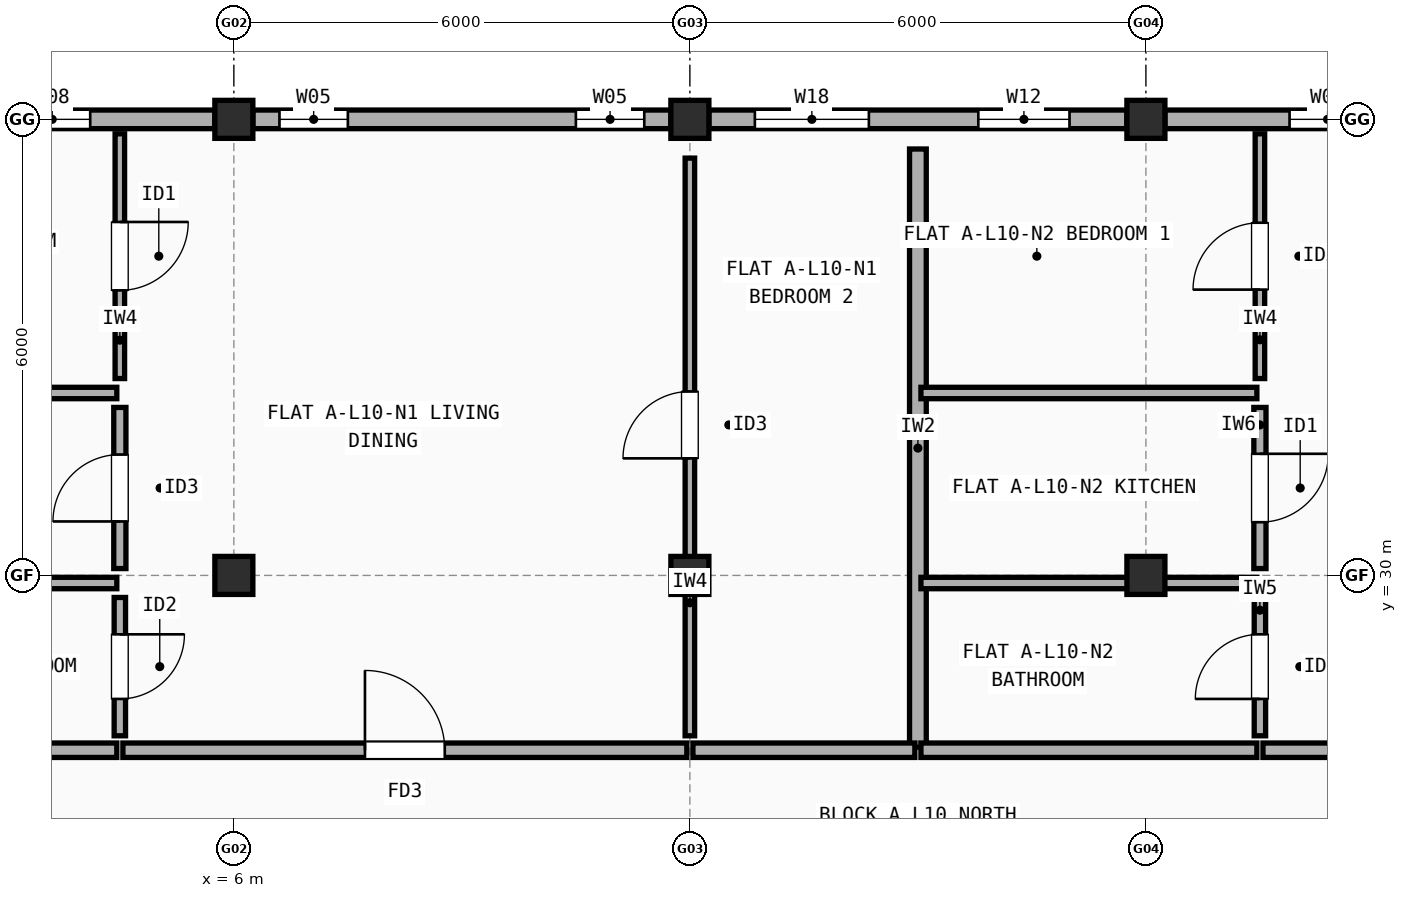
"""IFC4 building model, lengths in metres.
Left out: names, types, materials, properties, quantities, classifications, styles, units other than length and angle.
Written with IfcOpenShell. Run it as: python <this file> out.ifc"""

import sys

from ifc_helpers import new_model, si_unit, direction, frame, frame_2d, origin, origin_2d, place, context, subcontext, project, spatial, rectangle, extrude, element, fill, save


model = new_model("IFC4")
c1 = context("Model", 3, precision=1e-05, world=origin(), true_north=direction((0.0, 1.0)))
c2 = subcontext(c1, "Body", "Model", "MODEL_VIEW")
j1 = project(units=[si_unit("LENGTHUNIT", "METRE"), si_unit("PLANEANGLEUNIT", "RADIAN")], contexts=[c1])
p1 = place(None, origin())
s1 = spatial("IfcSite", under=j1, at=p1, CompositionType="ELEMENT")
p2 = place(p1, origin())
s2 = spatial("IfcBuilding", under=s1, at=p2, CompositionType="ELEMENT")
p3 = place(p2, frame((0.0, 0.0, 33.3)))
s3 = spatial("IfcBuildingStorey", under=s2, at=p3, CompositionType="ELEMENT", Elevation=33.3)
for number, where, z_axis, x_axis in (
    (1, (6.0, 30.0, 0.0), (0.0, 0.0, 1.0), (1.0, 0.0, 0.0)),
    (2, (6.0, 36.0, 0.0), (0.0, 0.0, 1.0), (1.0, 0.0, 0.0)),
    (3, (12.0, 30.0, 0.0), (0.0, 0.0, 1.0), (1.0, 0.0, 0.0)),
    (4, (12.0, 36.0, 0.0), (0.0, 0.0, 1.0), (1.0, 0.0, 0.0)),
    (5, (18.0, 30.0, 0.0), (0.0, 0.0, 1.0), (1.0, 0.0, 0.0)),
    (6, (18.0, 36.0, 0.0), (0.0, 0.0, 1.0), (1.0, 0.0, 0.0)),
):
    element("IfcColumn", number, at=place(p3, frame(where, z_axis=z_axis, x_axis=x_axis)), inside=s3, PredefinedType="COLUMN", context=c2, shape_type="SweptSolid", body=[
        extrude(rectangle(XDim=0.5, YDim=0.5, at=origin_2d()), origin(), (0.0, 0.0, 1.0), 2.99),
    ])
p4 = place(p3, frame((23.75, 36.0, 0.0), z_axis=(0.0, 0.0, 1.0), x_axis=(-1.0, 0.0, 0.0)))
e7 = element("IfcWall", 7, at=p4, inside=s3, PredefinedType="STANDARD", context=c2, shape_type="SweptSolid", body=[
    extrude(rectangle(XDim=5.5, YDim=0.245, at=frame_2d((2.75, 0.0))), origin(), (0.0, 0.0, 1.0), 2.472),
])
p5 = place(p4, frame((0.35, 0.0, 0.9)))
e8 = element("IfcOpeningElement", 8, at=p5, cuts=e7, PredefinedType="OPENING", context=c2, shape_type="SweptSolid", body=[
    extrude(rectangle(XDim=1.0, YDim=1.4, at=frame_2d((0.5, 0.7))), frame((0.0, 0.133, 0.0), z_axis=(0.0, -1.0, 0.0), x_axis=(1.0, 0.0, 0.0)), (0.0, 0.0, 1.0), 0.265),
])
p6 = place(p4, frame((2.86, 0.0, 0.9)))
e9 = element("IfcOpeningElement", 9, at=p6, cuts=e7, PredefinedType="OPENING", context=c2, shape_type="SweptSolid", body=[
    extrude(rectangle(XDim=1.0, YDim=1.4, at=frame_2d((0.5, 0.7))), frame((0.0, 0.133, 0.0), z_axis=(0.0, -1.0, 0.0), x_axis=(1.0, 0.0, 0.0)), (0.0, 0.0, 1.0), 0.265),
])
p7 = place(p3, frame((17.75, 36.0, 0.0), z_axis=(0.0, 0.0, 1.0), x_axis=(-1.0, 0.0, 0.0)))
e10 = element("IfcWall", 10, at=p7, inside=s3, PredefinedType="STANDARD", context=c2, shape_type="SweptSolid", body=[
    extrude(rectangle(XDim=5.5, YDim=0.245, at=frame_2d((2.75, 0.0))), origin(), (0.0, 0.0, 1.0), 2.472),
])
p8 = place(p7, frame((0.755, 0.0, 0.9)))
e11 = element("IfcOpeningElement", 11, at=p8, cuts=e10, PredefinedType="OPENING", context=c2, shape_type="SweptSolid", body=[
    extrude(rectangle(XDim=1.2, YDim=1.35, at=frame_2d((0.6, 0.675))), frame((0.0, 0.133, 0.0), z_axis=(0.0, -1.0, 0.0), x_axis=(1.0, 0.0, 0.0)), (0.0, 0.0, 1.0), 0.265),
])
p9 = place(p7, frame((3.395, 0.0, 0.9)))
e12 = element("IfcOpeningElement", 12, at=p9, cuts=e10, PredefinedType="OPENING", context=c2, shape_type="SweptSolid", body=[
    extrude(rectangle(XDim=1.5, YDim=1.4, at=frame_2d((0.75, 0.7))), frame((0.0, 0.133, 0.0), z_axis=(0.0, -1.0, 0.0), x_axis=(1.0, 0.0, 0.0)), (0.0, 0.0, 1.0), 0.265),
])
p10 = place(p3, frame((11.75, 36.0, 0.0), z_axis=(0.0, 0.0, 1.0), x_axis=(-1.0, 0.0, 0.0)))
e13 = element("IfcWall", 13, at=p10, inside=s3, PredefinedType="STANDARD", context=c2, shape_type="SweptSolid", body=[
    extrude(rectangle(XDim=5.5, YDim=0.245, at=frame_2d((2.75, 0.0))), origin(), (0.0, 0.0, 1.0), 2.472),
])
p11 = place(p10, frame((0.35, 0.0, 0.9)))
e14 = element("IfcOpeningElement", 14, at=p11, cuts=e13, PredefinedType="OPENING", context=c2, shape_type="SweptSolid", body=[
    extrude(rectangle(XDim=0.9, YDim=1.4, at=frame_2d((0.45, 0.7))), frame((0.0, 0.133, 0.0), z_axis=(0.0, -1.0, 0.0), x_axis=(1.0, 0.0, 0.0)), (0.0, 0.0, 1.0), 0.265),
])
p12 = place(p10, frame((4.25, 0.0, 0.9)))
e15 = element("IfcOpeningElement", 15, at=p12, cuts=e13, PredefinedType="OPENING", context=c2, shape_type="SweptSolid", body=[
    extrude(rectangle(XDim=0.9, YDim=1.4, at=frame_2d((0.45, 0.7))), frame((0.0, 0.133, 0.0), z_axis=(0.0, -1.0, 0.0), x_axis=(1.0, 0.0, 0.0)), (0.0, 0.0, 1.0), 0.265),
])
p13 = place(p3, frame((5.75, 36.0, 0.0), z_axis=(0.0, 0.0, 1.0), x_axis=(-1.0, 0.0, 0.0)))
e16 = element("IfcWall", 16, at=p13, inside=s3, PredefinedType="STANDARD", context=c2, shape_type="SweptSolid", body=[
    extrude(rectangle(XDim=5.525, YDim=0.245, at=frame_2d((2.762, 0.0))), origin(), (0.0, 0.0, 1.0), 2.472),
])
p14 = place(p13, frame((1.64, 0.0, 0.9)))
e17 = element("IfcOpeningElement", 17, at=p14, cuts=e16, PredefinedType="OPENING", context=c2, shape_type="SweptSolid", body=[
    extrude(rectangle(XDim=1.0, YDim=1.4, at=frame_2d((0.5, 0.7))), frame((0.0, 0.133, 0.0), z_axis=(0.0, -1.0, 0.0), x_axis=(1.0, 0.0, 0.0)), (0.0, 0.0, 1.0), 0.265),
])
p15 = place(p13, frame((4.175, 0.0, 0.9)))
e18 = element("IfcOpeningElement", 18, at=p15, cuts=e16, PredefinedType="OPENING", context=c2, shape_type="SweptSolid", body=[
    extrude(rectangle(XDim=1.0, YDim=1.4, at=frame_2d((0.5, 0.7))), frame((0.0, 0.133, 0.0), z_axis=(0.0, -1.0, 0.0), x_axis=(1.0, 0.0, 0.0)), (0.0, 0.0, 1.0), 0.265),
])
p16 = place(p3, frame((15.0, 27.74, 0.0), z_axis=(0.0, 0.0, 1.0), x_axis=(0.0, 1.0, 0.0)))
e19 = element("IfcWall", 19, at=p16, inside=s3, PredefinedType="SOLIDWALL", context=c2, shape_type="SweptSolid", body=[
    extrude(rectangle(XDim=7.87, YDim=0.22, at=frame_2d((3.935, 0.0))), origin(), (0.0, 0.0, 1.0), 2.472),
])
p17 = place(p3, frame((0.04, 27.7, 0.0), z_axis=(0.0, 0.0, 1.0), x_axis=(1.0, 0.0, 0.0)))
e20 = element("IfcWall", 20, at=p17, inside=s3, PredefinedType="SOLIDWALL", context=c2, shape_type="SweptSolid", body=[
    extrude(rectangle(XDim=4.42, YDim=0.19, at=frame_2d((2.21, 0.0))), origin(), (0.0, 0.0, 1.0), 2.472),
])
p18 = place(p3, frame((4.54, 27.7, 0.0), z_axis=(0.0, 0.0, 1.0), x_axis=(1.0, 0.0, 0.0)))
e21 = element("IfcWall", 21, at=p18, inside=s3, PredefinedType="SOLIDWALL", context=c2, shape_type="SweptSolid", body=[
    extrude(rectangle(XDim=7.42, YDim=0.19, at=frame_2d((3.71, 0.0))), origin(), (0.0, 0.0, 1.0), 2.508),
])
p19 = place(p18, frame((3.185, 0.0, 0.0)))
e22 = element("IfcOpeningElement", 22, at=p19, cuts=e21, PredefinedType="OPENING", context=c2, shape_type="SweptSolid", body=[
    extrude(rectangle(XDim=1.05, YDim=2.15, at=frame_2d((0.525, 1.075))), frame((0.0, 0.105, 0.0), z_axis=(0.0, -1.0, 0.0), x_axis=(1.0, 0.0, 0.0)), (0.0, 0.0, 1.0), 0.21),
])
p20 = place(p3, frame((4.5, 32.59, 0.0), z_axis=(0.0, 0.0, 1.0), x_axis=(0.0, 1.0, 0.0)))
e23 = element("IfcWall", 23, at=p20, inside=s3, PredefinedType="PARTITIONING", context=c2, shape_type="SweptSolid", body=[
    extrude(rectangle(XDim=3.22, YDim=0.125, at=frame_2d((1.61, 0.0))), origin(), (0.0, 0.0, 1.0), 2.99),
])
p21 = place(p20, frame((1.16, 0.0, 0.0)))
e24 = element("IfcOpeningElement", 24, at=p21, cuts=e23, PredefinedType="OPENING", context=c2, shape_type="SweptSolid", body=[
    extrude(rectangle(XDim=0.9, YDim=2.1, at=frame_2d((0.45, 1.05))), frame((0.0, 0.073, 0.0), z_axis=(0.0, -1.0, 0.0), x_axis=(1.0, 0.0, 0.0)), (0.0, 0.0, 1.0), 0.145),
])
p22 = place(p3, frame((4.5, 30.09, 0.0), z_axis=(0.0, 0.0, 1.0), x_axis=(0.0, 1.0, 0.0)))
e25 = element("IfcWall", 25, at=p22, inside=s3, PredefinedType="PLUMBINGWALL", context=c2, shape_type="SweptSolid", body=[
    extrude(rectangle(XDim=2.12, YDim=0.16, at=frame_2d((1.06, 0.0))), origin(), (0.0, 0.0, 1.0), 2.472),
])
p23 = place(p22, frame((0.62, 0.0, 0.0)))
e26 = element("IfcOpeningElement", 26, at=p23, cuts=e25, PredefinedType="OPENING", context=c2, shape_type="SweptSolid", body=[
    extrude(rectangle(XDim=0.88, YDim=2.1, at=frame_2d((0.44, 1.05))), frame((0.0, 0.09, 0.0), z_axis=(0.0, -1.0, 0.0), x_axis=(1.0, 0.0, 0.0)), (0.0, 0.0, 1.0), 0.18),
])
p24 = place(p3, frame((4.5, 27.89, 0.0), z_axis=(0.0, 0.0, 1.0), x_axis=(0.0, 1.0, 0.0)))
e27 = element("IfcWall", 27, at=p24, inside=s3, PredefinedType="PARTITIONING", context=c2, shape_type="SweptSolid", body=[
    extrude(rectangle(XDim=1.82, YDim=0.15, at=frame_2d((0.91, 0.0))), origin(), (0.0, 0.0, 1.0), 2.99),
])
p25 = place(p24, frame((0.485, 0.0, 0.0)))
e28 = element("IfcOpeningElement", 28, at=p25, cuts=e27, PredefinedType="OPENING", context=c2, shape_type="SweptSolid", body=[
    extrude(rectangle(XDim=0.85, YDim=2.1, at=frame_2d((0.425, 1.05))), frame((0.0, 0.085, 0.0), z_axis=(0.0, -1.0, 0.0), x_axis=(1.0, 0.0, 0.0)), (0.0, 0.0, 1.0), 0.17),
])
p26 = place(p3, frame((0.04, 32.4, 0.0), z_axis=(0.0, 0.0, 1.0), x_axis=(1.0, 0.0, 0.0)))
e29 = element("IfcWall", 29, at=p26, inside=s3, PredefinedType="PARTITIONING", context=c2, shape_type="SweptSolid", body=[
    extrude(rectangle(XDim=4.42, YDim=0.15, at=frame_2d((2.21, 0.0))), origin(), (0.0, 0.0, 1.0), 2.472),
])
p27 = place(p3, frame((0.36, 29.9, 0.0), z_axis=(0.0, 0.0, 1.0), x_axis=(1.0, 0.0, 0.0)))
e30 = element("IfcWall", 30, at=p27, inside=s3, PredefinedType="PARTITIONING", context=c2, shape_type="SweptSolid", body=[
    extrude(rectangle(XDim=4.1, YDim=0.15, at=frame_2d((2.05, 0.0))), origin(), (0.0, 0.0, 1.0), 2.472),
])
p28 = place(p3, frame((12.04, 27.7, 0.0), z_axis=(0.0, 0.0, 1.0), x_axis=(1.0, 0.0, 0.0)))
e31 = element("IfcWall", 31, at=p28, inside=s3, PredefinedType="SOLIDWALL", context=c2, shape_type="SweptSolid", body=[
    extrude(rectangle(XDim=2.92, YDim=0.19, at=frame_2d((1.46, 0.0))), origin(), (0.0, 0.0, 1.0), 2.508),
])
p29 = place(p3, frame((12.0, 27.89, 0.0), z_axis=(0.0, 0.0, 1.0), x_axis=(0.0, 1.0, 0.0)))
e32 = element("IfcWall", 32, at=p29, inside=s3, PredefinedType="PARTITIONING", context=c2, shape_type="SweptSolid", body=[
    extrude(rectangle(XDim=7.6, YDim=0.125, at=frame_2d((3.8, 0.0))), origin(), (0.0, 0.0, 1.0), 2.458),
])
p30 = place(p29, frame((3.65, 0.0, 0.0)))
e33 = element("IfcOpeningElement", 33, at=p30, cuts=e32, PredefinedType="OPENING", context=c2, shape_type="SweptSolid", body=[
    extrude(rectangle(XDim=0.88, YDim=2.1, at=frame_2d((0.44, 1.05))), frame((0.0, 0.073, 0.0), z_axis=(0.0, -1.0, 0.0), x_axis=(1.0, 0.0, 0.0)), (0.0, 0.0, 1.0), 0.145),
])
p31 = place(p3, frame((15.04, 27.7, 0.0), z_axis=(0.0, 0.0, 1.0), x_axis=(1.0, 0.0, 0.0)))
e34 = element("IfcWall", 34, at=p31, inside=s3, PredefinedType="SOLIDWALL", context=c2, shape_type="SweptSolid", body=[
    extrude(rectangle(XDim=4.42, YDim=0.19, at=frame_2d((2.21, 0.0))), origin(), (0.0, 0.0, 1.0), 2.99),
])
p32 = place(p3, frame((19.54, 27.7, 0.0), z_axis=(0.0, 0.0, 1.0), x_axis=(1.0, 0.0, 0.0)))
e35 = element("IfcWall", 35, at=p32, inside=s3, PredefinedType="SOLIDWALL", context=c2, shape_type="SweptSolid", body=[
    extrude(rectangle(XDim=7.42, YDim=0.19, at=frame_2d((3.71, 0.0))), origin(), (0.0, 0.0, 1.0), 2.99),
])
p33 = place(p32, frame((3.22, 0.0, 0.0)))
e36 = element("IfcOpeningElement", 36, at=p33, cuts=e35, PredefinedType="OPENING", context=c2, shape_type="SweptSolid", body=[
    extrude(rectangle(XDim=0.98, YDim=2.15, at=frame_2d((0.49, 1.075))), frame((0.0, 0.105, 0.0), z_axis=(0.0, -1.0, 0.0), x_axis=(1.0, 0.0, 0.0)), (0.0, 0.0, 1.0), 0.21),
])
p34 = place(p3, frame((19.5, 32.59, 0.0), z_axis=(0.0, 0.0, 1.0), x_axis=(0.0, 1.0, 0.0)))
e37 = element("IfcWall", 37, at=p34, inside=s3, PredefinedType="PARTITIONING", context=c2, shape_type="SweptSolid", body=[
    extrude(rectangle(XDim=3.22, YDim=0.125, at=frame_2d((1.61, 0.0))), origin(), (0.0, 0.0, 1.0), 2.99),
])
p35 = place(p34, frame((1.17, 0.0, 0.0)))
e38 = element("IfcOpeningElement", 38, at=p35, cuts=e37, PredefinedType="OPENING", context=c2, shape_type="SweptSolid", body=[
    extrude(rectangle(XDim=0.88, YDim=2.1, at=frame_2d((0.44, 1.05))), frame((0.0, 0.073, 0.0), z_axis=(0.0, -1.0, 0.0), x_axis=(1.0, 0.0, 0.0)), (0.0, 0.0, 1.0), 0.145),
])
p36 = place(p3, frame((19.5, 30.09, 0.0), z_axis=(0.0, 0.0, 1.0), x_axis=(0.0, 1.0, 0.0)))
e39 = element("IfcWall", 39, at=p36, inside=s3, PredefinedType="PLUMBINGWALL", context=c2, shape_type="SweptSolid", body=[
    extrude(rectangle(XDim=2.12, YDim=0.16, at=frame_2d((1.06, 0.0))), origin(), (0.0, 0.0, 1.0), 2.472),
])
p37 = place(p36, frame((0.61, 0.0, 0.0)))
e40 = element("IfcOpeningElement", 40, at=p37, cuts=e39, PredefinedType="OPENING", context=c2, shape_type="SweptSolid", body=[
    extrude(rectangle(XDim=0.9, YDim=2.1, at=frame_2d((0.45, 1.05))), frame((0.0, 0.09, 0.0), z_axis=(0.0, -1.0, 0.0), x_axis=(1.0, 0.0, 0.0)), (0.0, 0.0, 1.0), 0.18),
])
p38 = place(p3, frame((19.5, 27.89, 0.0), z_axis=(0.0, 0.0, 1.0), x_axis=(0.0, 1.0, 0.0)))
e41 = element("IfcWall", 41, at=p38, inside=s3, PredefinedType="PARTITIONING", context=c2, shape_type="SweptSolid", body=[
    extrude(rectangle(XDim=1.82, YDim=0.15, at=frame_2d((0.91, 0.0))), origin(), (0.0, 0.0, 1.0), 2.99),
])
p39 = place(p38, frame((0.485, 0.0, 0.0)))
e42 = element("IfcOpeningElement", 42, at=p39, cuts=e41, PredefinedType="OPENING", context=c2, shape_type="SweptSolid", body=[
    extrude(rectangle(XDim=0.85, YDim=2.1, at=frame_2d((0.425, 1.05))), frame((0.0, 0.085, 0.0), z_axis=(0.0, -1.0, 0.0), x_axis=(1.0, 0.0, 0.0)), (0.0, 0.0, 1.0), 0.17),
])
p40 = place(p3, frame((15.04, 32.4, 0.0), z_axis=(0.0, 0.0, 1.0), x_axis=(1.0, 0.0, 0.0)))
e43 = element("IfcWall", 43, at=p40, inside=s3, PredefinedType="PARTITIONING", context=c2, shape_type="SweptSolid", body=[
    extrude(rectangle(XDim=4.42, YDim=0.15, at=frame_2d((2.21, 0.0))), origin(), (0.0, 0.0, 1.0), 2.458),
])
p41 = place(p3, frame((15.04, 29.9, 0.0), z_axis=(0.0, 0.0, 1.0), x_axis=(1.0, 0.0, 0.0)))
e44 = element("IfcWall", 44, at=p41, inside=s3, PredefinedType="PARTITIONING", context=c2, shape_type="SweptSolid", body=[
    extrude(rectangle(XDim=4.42, YDim=0.15, at=frame_2d((2.21, 0.0))), origin(), (0.0, 0.0, 1.0), 2.472),
])
p42 = place(p6, origin())
e45 = element("IfcWindow", 45, at=p42, inside=s3, PartitioningType="SINGLE_PANEL", PredefinedType="WINDOW", context=c2, shape_type="SweptSolid", body=[
    extrude(rectangle(XDim=1.0, YDim=1.4, at=frame_2d((0.5, 0.7))), frame((0.0, 0.03, 0.0), z_axis=(0.0, -1.0, 0.0), x_axis=(1.0, 0.0, 0.0)), (0.0, 0.0, 1.0), 0.06),
])
fill(e9, e45)
p43 = place(p8, origin())
e46 = element("IfcWindow", 46, at=p43, inside=s3, PartitioningType="SINGLE_PANEL", PredefinedType="WINDOW", context=c2, shape_type="SweptSolid", body=[
    extrude(rectangle(XDim=1.2, YDim=1.35, at=frame_2d((0.6, 0.675))), frame((0.0, 0.03, 0.0), z_axis=(0.0, -1.0, 0.0), x_axis=(1.0, 0.0, 0.0)), (0.0, 0.0, 1.0), 0.06),
])
fill(e11, e46)
p44 = place(p9, origin())
e47 = element("IfcWindow", 47, at=p44, inside=s3, PartitioningType="SINGLE_PANEL", PredefinedType="WINDOW", context=c2, shape_type="SweptSolid", body=[
    extrude(rectangle(XDim=1.5, YDim=1.4, at=frame_2d((0.75, 0.7))), frame((0.0, 0.03, 0.0), z_axis=(0.0, -1.0, 0.0), x_axis=(1.0, 0.0, 0.0)), (0.0, 0.0, 1.0), 0.06),
])
fill(e12, e47)
p45 = place(p11, origin())
e48 = element("IfcWindow", 48, at=p45, inside=s3, PartitioningType="SINGLE_PANEL", PredefinedType="WINDOW", context=c2, shape_type="SweptSolid", body=[
    extrude(rectangle(XDim=0.9, YDim=1.4, at=frame_2d((0.45, 0.7))), frame((0.0, 0.03, 0.0), z_axis=(0.0, -1.0, 0.0), x_axis=(1.0, 0.0, 0.0)), (0.0, 0.0, 1.0), 0.06),
])
fill(e14, e48)
p46 = place(p12, origin())
e49 = element("IfcWindow", 49, at=p46, inside=s3, PartitioningType="SINGLE_PANEL", PredefinedType="WINDOW", context=c2, shape_type="SweptSolid", body=[
    extrude(rectangle(XDim=0.9, YDim=1.4, at=frame_2d((0.45, 0.7))), frame((0.0, 0.03, 0.0), z_axis=(0.0, -1.0, 0.0), x_axis=(1.0, 0.0, 0.0)), (0.0, 0.0, 1.0), 0.06),
])
fill(e15, e49)
p47 = place(p14, origin())
e50 = element("IfcWindow", 50, at=p47, inside=s3, PartitioningType="SINGLE_PANEL", PredefinedType="WINDOW", context=c2, shape_type="SweptSolid", body=[
    extrude(rectangle(XDim=1.0, YDim=1.4, at=frame_2d((0.5, 0.7))), frame((0.0, 0.03, 0.0), z_axis=(0.0, -1.0, 0.0), x_axis=(1.0, 0.0, 0.0)), (0.0, 0.0, 1.0), 0.06),
])
fill(e17, e50)
p48 = place(p19, origin())
e51 = element("IfcDoor", 51, at=p48, inside=s3, OperationType="SINGLE_SWING_LEFT", PredefinedType="DOOR", context=c2, shape_type="SweptSolid", body=[
    extrude(rectangle(XDim=1.05, YDim=2.15, at=frame_2d((0.525, 1.075))), frame((0.0, 0.025, 0.0), z_axis=(0.0, -1.0, 0.0), x_axis=(1.0, 0.0, 0.0)), (0.0, 0.0, 1.0), 0.05),
])
fill(e22, e51)
p49 = place(p21, origin())
e52 = element("IfcDoor", 52, at=p49, inside=s3, OperationType="SINGLE_SWING_RIGHT", PredefinedType="DOOR", context=c2, shape_type="SweptSolid", body=[
    extrude(rectangle(XDim=0.9, YDim=2.1, at=frame_2d((0.45, 1.05))), frame((0.0, 0.025, 0.0), z_axis=(0.0, -1.0, 0.0), x_axis=(1.0, 0.0, 0.0)), (0.0, 0.0, 1.0), 0.05),
])
fill(e24, e52)
p50 = place(p23, origin())
e53 = element("IfcDoor", 53, at=p50, inside=s3, OperationType="SINGLE_SWING_LEFT", PredefinedType="DOOR", context=c2, shape_type="SweptSolid", body=[
    extrude(rectangle(XDim=0.88, YDim=2.1, at=frame_2d((0.44, 1.05))), frame((0.0, 0.025, 0.0), z_axis=(0.0, -1.0, 0.0), x_axis=(1.0, 0.0, 0.0)), (0.0, 0.0, 1.0), 0.05),
])
fill(e26, e53)
p51 = place(p25, origin())
e54 = element("IfcDoor", 54, at=p51, inside=s3, OperationType="SINGLE_SWING_RIGHT", PredefinedType="DOOR", context=c2, shape_type="SweptSolid", body=[
    extrude(rectangle(XDim=0.85, YDim=2.1, at=frame_2d((0.425, 1.05))), frame((0.0, 0.025, 0.0), z_axis=(0.0, -1.0, 0.0), x_axis=(1.0, 0.0, 0.0)), (0.0, 0.0, 1.0), 0.05),
])
fill(e28, e54)
p52 = place(p30, origin())
e55 = element("IfcDoor", 55, at=p52, inside=s3, OperationType="SINGLE_SWING_LEFT", PredefinedType="DOOR", context=c2, shape_type="SweptSolid", body=[
    extrude(rectangle(XDim=0.88, YDim=2.1, at=frame_2d((0.44, 1.05))), frame((0.0, 0.025, 0.0), z_axis=(0.0, -1.0, 0.0), x_axis=(1.0, 0.0, 0.0)), (0.0, 0.0, 1.0), 0.05),
])
fill(e33, e55)
p53 = place(p35, origin())
e56 = element("IfcDoor", 56, at=p53, inside=s3, OperationType="SINGLE_SWING_LEFT", PredefinedType="DOOR", context=c2, shape_type="SweptSolid", body=[
    extrude(rectangle(XDim=0.88, YDim=2.1, at=frame_2d((0.44, 1.05))), frame((0.0, 0.025, 0.0), z_axis=(0.0, -1.0, 0.0), x_axis=(1.0, 0.0, 0.0)), (0.0, 0.0, 1.0), 0.05),
])
fill(e38, e56)
p54 = place(p37, origin())
e57 = element("IfcDoor", 57, at=p54, inside=s3, OperationType="SINGLE_SWING_RIGHT", PredefinedType="DOOR", context=c2, shape_type="SweptSolid", body=[
    extrude(rectangle(XDim=0.9, YDim=2.1, at=frame_2d((0.45, 1.05))), frame((0.0, 0.025, 0.0), z_axis=(0.0, -1.0, 0.0), x_axis=(1.0, 0.0, 0.0)), (0.0, 0.0, 1.0), 0.05),
])
fill(e40, e57)
p55 = place(p39, origin())
e58 = element("IfcDoor", 58, at=p55, inside=s3, OperationType="SINGLE_SWING_LEFT", PredefinedType="DOOR", context=c2, shape_type="SweptSolid", body=[
    extrude(rectangle(XDim=0.85, YDim=2.1, at=frame_2d((0.425, 1.05))), frame((0.0, 0.025, 0.0), z_axis=(0.0, -1.0, 0.0), x_axis=(1.0, 0.0, 0.0)), (0.0, 0.0, 1.0), 0.05),
])
fill(e42, e58)
save(model, sys.argv[1])
